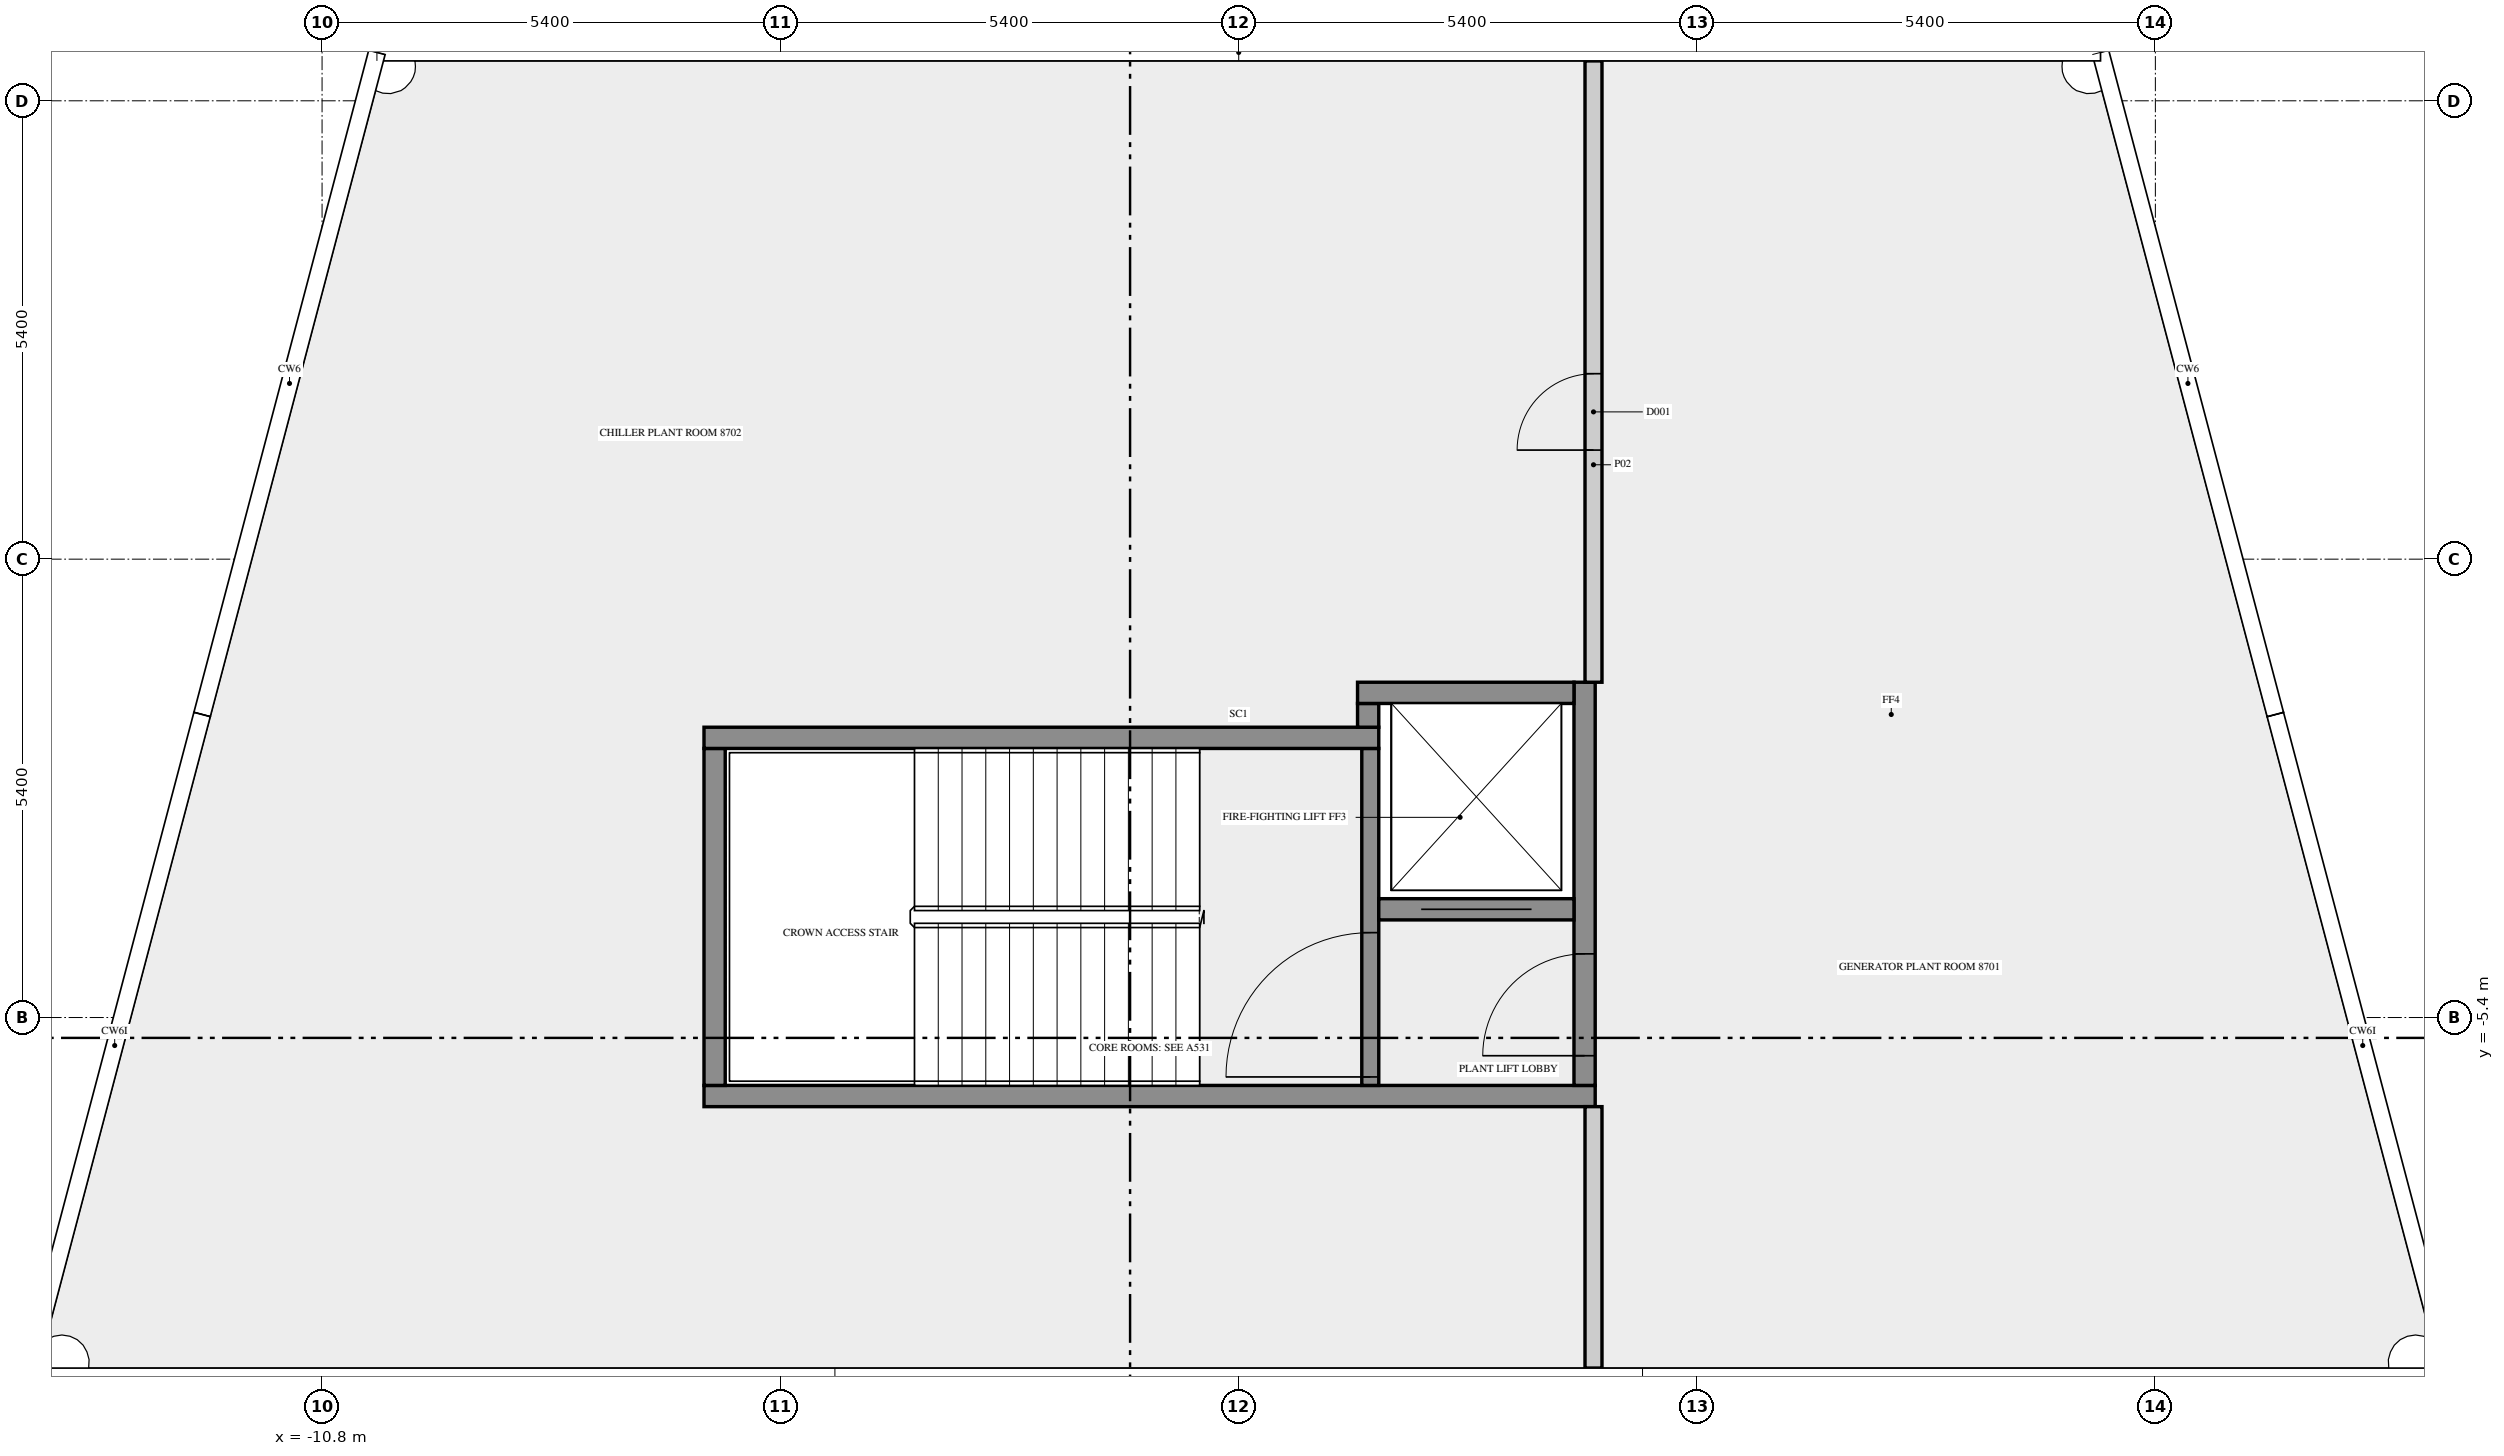
"""IFC4 building model, lengths in metres.
Left out: names, types, materials, properties, quantities, classifications, styles, units other than length and angle.
Written with IfcOpenShell. Run it as: python <this file> out.ifc"""

import sys

from ifc_helpers import new_model, si_unit, direction, frame, frame_2d, origin, place, context, subcontext, project, spatial, rectangle, extrude, element, fill, save


model = new_model("IFC4")
c1 = context("Model", 3, precision=1e-05, world=origin(), true_north=direction((0.0, 1.0)))
c2 = subcontext(c1, "Body", "Model", "MODEL_VIEW")
j1 = project(units=[si_unit("LENGTHUNIT", "METRE"), si_unit("PLANEANGLEUNIT", "RADIAN")], contexts=[c1])
p1 = place(None, origin())
s1 = spatial("IfcSite", under=j1, at=p1, CompositionType="ELEMENT")
p2 = place(p1, origin())
s2 = spatial("IfcBuilding", under=s1, at=p2, CompositionType="ELEMENT")
p3 = place(p2, frame((0.0, 0.0, 376.0)))
s3 = spatial("IfcBuildingStorey", under=s2, at=p3, CompositionType="ELEMENT", Elevation=376.0)
p4 = place(p3, frame((-6.3, -6.325, 0.0), z_axis=(0.0, 0.0, 1.0), x_axis=(1.0, 0.0, 0.0)))
e1 = element("IfcWall", 1, at=p4, inside=s3, PredefinedType="SHEAR", context=c2, shape_type="SweptSolid", body=[
    extrude(rectangle(XDim=10.5, YDim=0.25, at=frame_2d((5.25, 0.0))), origin(), (0.0, 0.0, 1.0), 3.75),
])
p5 = place(p3, frame((-6.175, -6.2, 0.0), z_axis=(0.0, 0.0, 1.0), x_axis=(0.0, 1.0, 0.0)))
e2 = element("IfcWall", 2, at=p5, inside=s3, PredefinedType="SHEAR", context=c2, shape_type="SweptSolid", body=[
    extrude(rectangle(XDim=3.97, YDim=0.25, at=frame_2d((1.985, 0.0))), origin(), (0.0, 0.0, 1.0), 3.75),
])
p6 = place(p3, frame((1.55, -6.2, 0.0), z_axis=(0.0, 0.0, 1.0), x_axis=(0.0, 1.0, 0.0)))
e3 = element("IfcWall", 3, at=p6, inside=s3, PredefinedType="SHEAR", context=c2, shape_type="SweptSolid", body=[
    extrude(rectangle(XDim=3.97, YDim=0.2, at=frame_2d((1.985, 0.0))), origin(), (0.0, 0.0, 1.0), 3.75),
])
p7 = place(p6, frame((0.1, 0.0, 0.0)))
e4 = element("IfcOpeningElement", 4, at=p7, cuts=e3, PredefinedType="OPENING", context=c2, shape_type="SweptSolid", body=[
    extrude(rectangle(XDim=1.7, YDim=2.1, at=frame_2d((0.85, 1.05))), frame((0.0, 0.11, 0.0), z_axis=(0.0, -1.0, 0.0), x_axis=(1.0, 0.0, 0.0)), (0.0, 0.0, 1.0), 0.22),
])
p8 = place(p3, frame((4.075, -6.2, 0.0), z_axis=(0.0, 0.0, 1.0), x_axis=(0.0, 1.0, 0.0)))
e5 = element("IfcWall", 5, at=p8, inside=s3, PredefinedType="SHEAR", context=c2, shape_type="SweptSolid", body=[
    extrude(rectangle(XDim=4.75, YDim=0.25, at=frame_2d((2.375, 0.0))), origin(), (0.0, 0.0, 1.0), 3.75),
])
p9 = place(p8, frame((0.35, 0.0, 0.0)))
e6 = element("IfcOpeningElement", 6, at=p9, cuts=e5, PredefinedType="OPENING", context=c2, shape_type="SweptSolid", body=[
    extrude(rectangle(XDim=1.2, YDim=2.1, at=frame_2d((0.6, 1.05))), frame((0.0, 0.135, 0.0), z_axis=(0.0, -1.0, 0.0), x_axis=(1.0, 0.0, 0.0)), (0.0, 0.0, 1.0), 0.27),
])
p10 = place(p3, frame((1.65, -4.125, 0.0), z_axis=(0.0, 0.0, 1.0), x_axis=(1.0, 0.0, 0.0)))
e7 = element("IfcWall", 7, at=p10, inside=s3, PredefinedType="SHEAR", context=c2, shape_type="SweptSolid", body=[
    extrude(rectangle(XDim=2.3, YDim=0.25, at=frame_2d((1.15, 0.0))), origin(), (0.0, 0.0, 1.0), 3.75),
])
p11 = place(p10, frame((0.5, 0.0, 0.0)))
e8 = element("IfcOpeningElement", 8, at=p11, cuts=e7, PredefinedType="OPENING", context=c2, shape_type="SweptSolid", body=[
    extrude(rectangle(XDim=1.3, YDim=2.1, at=frame_2d((0.65, 1.05))), frame((0.0, 0.135, 0.0), z_axis=(0.0, -1.0, 0.0), x_axis=(1.0, 0.0, 0.0)), (0.0, 0.0, 1.0), 0.27),
])
p12 = place(p3, frame((-6.3, -2.105, 0.0), z_axis=(0.0, 0.0, 1.0), x_axis=(1.0, 0.0, 0.0)))
e9 = element("IfcWall", 9, at=p12, inside=s3, PredefinedType="SHEAR", context=c2, shape_type="SweptSolid", body=[
    extrude(rectangle(XDim=7.95, YDim=0.25, at=frame_2d((3.975, 0.0))), origin(), (0.0, 0.0, 1.0), 3.75),
])
p13 = place(p3, frame((1.525, -1.98, 0.0), z_axis=(0.0, 0.0, 1.0), x_axis=(0.0, 1.0, 0.0)))
e10 = element("IfcWall", 10, at=p13, inside=s3, PredefinedType="SHEAR", context=c2, shape_type="SweptSolid", body=[
    extrude(rectangle(XDim=0.28, YDim=0.25, at=frame_2d((0.14, 0.0))), origin(), (0.0, 0.0, 1.0), 3.75),
])
p14 = place(p3, frame((1.4, -1.575, 0.0), z_axis=(0.0, 0.0, 1.0), x_axis=(1.0, 0.0, 0.0)))
e11 = element("IfcWall", 11, at=p14, inside=s3, PredefinedType="SHEAR", context=c2, shape_type="SweptSolid", body=[
    extrude(rectangle(XDim=2.55, YDim=0.25, at=frame_2d((1.275, 0.0))), origin(), (0.0, 0.0, 1.0), 3.75),
])
p15 = place(p3, frame((4.18, -9.53, 0.0), z_axis=(0.0, 0.0, 1.0), x_axis=(0.0, 1.0, 0.0)))
e12 = element("IfcWall", 12, at=p15, inside=s3, PredefinedType="SOLIDWALL", context=c2, shape_type="SweptSolid", body=[
    extrude(rectangle(XDim=3.08, YDim=0.2, at=frame_2d((1.54, 0.0))), origin(), (0.0, 0.0, 1.0), 2.838),
])
p16 = place(p3, frame((4.18, -1.45, 0.0), z_axis=(0.0, 0.0, 1.0), x_axis=(0.0, 1.0, 0.0)))
e13 = element("IfcWall", 13, at=p16, inside=s3, PredefinedType="SOLIDWALL", context=c2, shape_type="SweptSolid", body=[
    extrude(rectangle(XDim=7.32, YDim=0.2, at=frame_2d((3.66, 0.0))), origin(), (0.0, 0.0, 1.0), 2.838),
])
p17 = place(p16, frame((2.735, 0.0, 0.0)))
e14 = element("IfcOpeningElement", 14, at=p17, cuts=e13, PredefinedType="OPENING", context=c2, shape_type="SweptSolid", body=[
    extrude(rectangle(XDim=0.9, YDim=2.1, at=frame_2d((0.45, 1.05))), frame((0.0, 0.11, 0.0), z_axis=(0.0, -1.0, 0.0), x_axis=(1.0, 0.0, 0.0)), (0.0, 0.0, 1.0), 0.22),
])
p18 = place(p7, origin())
e15 = element("IfcDoor", 15, at=p18, inside=s3, OperationType="DOUBLE_DOOR_SINGLE_SWING", PredefinedType="DOOR", context=c2, shape_type="SweptSolid", body=[
    extrude(rectangle(XDim=1.7, YDim=2.1, at=frame_2d((0.85, 1.05))), frame((0.0, 0.025, 0.0), z_axis=(0.0, -1.0, 0.0), x_axis=(1.0, 0.0, 0.0)), (0.0, 0.0, 1.0), 0.05),
])
fill(e4, e15)
p19 = place(p9, origin())
e16 = element("IfcDoor", 16, at=p19, inside=s3, OperationType="SINGLE_SWING_LEFT", PredefinedType="DOOR", context=c2, shape_type="SweptSolid", body=[
    extrude(rectangle(XDim=1.2, YDim=2.1, at=frame_2d((0.6, 1.05))), frame((0.0, 0.025, 0.0), z_axis=(0.0, -1.0, 0.0), x_axis=(1.0, 0.0, 0.0)), (0.0, 0.0, 1.0), 0.05),
])
fill(e6, e16)
p20 = place(p11, origin())
e17 = element("IfcDoor", 17, at=p20, inside=s3, OperationType="DOUBLE_DOOR_SLIDING", PredefinedType="DOOR", context=c2, shape_type="SweptSolid", body=[
    extrude(rectangle(XDim=1.3, YDim=2.1, at=frame_2d((0.65, 1.05))), frame((0.0, 0.025, 0.0), z_axis=(0.0, -1.0, 0.0), x_axis=(1.0, 0.0, 0.0)), (0.0, 0.0, 1.0), 0.05),
])
fill(e8, e17)
p21 = place(p17, origin())
e18 = element("IfcDoor", 18, at=p21, inside=s3, OperationType="SINGLE_SWING_RIGHT", PredefinedType="DOOR", context=c2, shape_type="SweptSolid", body=[
    extrude(rectangle(XDim=0.9, YDim=2.1, at=frame_2d((0.45, 1.05))), frame((0.0, 0.025, 0.0), z_axis=(0.0, -1.0, 0.0), x_axis=(1.0, 0.0, 0.0)), (0.0, 0.0, 1.0), 0.05),
])
fill(e14, e18)
save(model, sys.argv[1])
